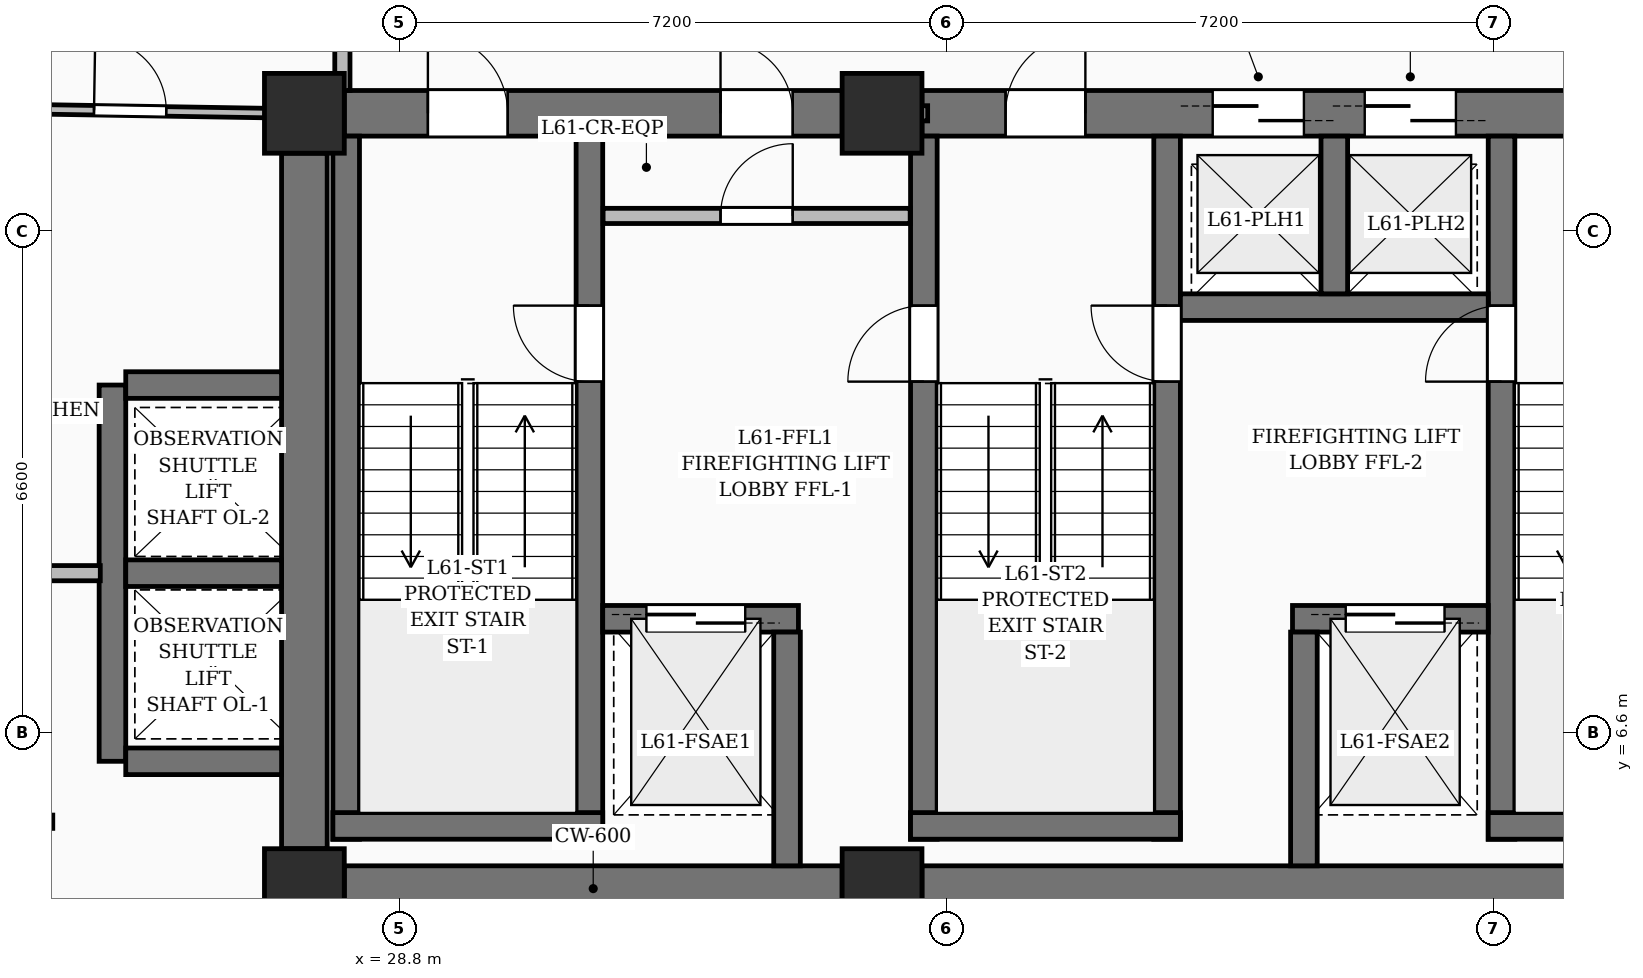
"""IFC4 building model, lengths in metres.
Left out: names, types, materials, properties, quantities, classifications, styles, units other than length and angle.
Written with IfcOpenShell. Run it as: python <this file> out.ifc"""

import sys

from ifc_helpers import new_model, si_unit, direction, frame, frame_2d, origin, origin_2d, place, context, subcontext, project, spatial, rectangle, extrude, element, fill, save


model = new_model("IFC4")
c1 = context("Model", 3, precision=1e-05, world=origin(), true_north=direction((0.0, 1.0)))
c2 = subcontext(c1, "Body", "Model", "MODEL_VIEW")
j1 = project(units=[si_unit("LENGTHUNIT", "METRE"), si_unit("PLANEANGLEUNIT", "RADIAN")], contexts=[c1])
p1 = place(None, origin())
s1 = spatial("IfcSite", under=j1, at=p1, CompositionType="ELEMENT")
p2 = place(p1, origin())
s2 = spatial("IfcBuilding", under=s1, at=p2, CompositionType="ELEMENT")
p3 = place(p2, frame((0.0, 0.0, 237.0)))
s3 = spatial("IfcBuildingStorey", under=s2, at=p3, CompositionType="ELEMENT", Elevation=237.0)
for number, where, z_axis, x_axis in (
    (1, (27.55, 4.55, 0.0), (0.0, 0.0, 1.0), (1.0, 0.0, 0.0)),
    (2, (35.15, 4.55, 0.0), (0.0, 0.0, 1.0), (1.0, 0.0, 0.0)),
    (3, (27.55, 14.75, 0.0), (0.0, 0.0, 1.0), (1.0, 0.0, 0.0)),
    (4, (35.15, 14.75, 0.0), (0.0, 0.0, 1.0), (1.0, 0.0, 0.0)),
):
    element("IfcColumn", number, at=place(p3, frame(where, z_axis=z_axis, x_axis=x_axis)), inside=s3, PredefinedType="COLUMN", context=c2, shape_type="SweptSolid", body=[
        extrude(rectangle(XDim=1.05, YDim=1.05, at=origin_2d()), origin(), (0.0, 0.0, 1.0), 3.75),
    ])
p4 = place(p3, frame((28.075, 4.55, 0.0), z_axis=(0.0, 0.0, 1.0), x_axis=(1.0, 0.0, 0.0)))
e5 = element("IfcWall", 5, at=p4, inside=s3, PredefinedType="SHEAR", context=c2, shape_type="SweptSolid", body=[
    extrude(rectangle(XDim=6.55, YDim=0.6, at=frame_2d((3.275, 0.0))), origin(), (0.0, 0.0, 1.0), 3.75),
])
p5 = place(p3, frame((35.675, 4.55, 0.0), z_axis=(0.0, 0.0, 1.0), x_axis=(1.0, 0.0, 0.0)))
e6 = element("IfcWall", 6, at=p5, inside=s3, PredefinedType="SHEAR", context=c2, shape_type="SweptSolid", body=[
    extrude(rectangle(XDim=10.85, YDim=0.6, at=frame_2d((5.425, 0.0))), origin(), (0.0, 0.0, 1.0), 3.75),
])
p6 = place(p3, frame((28.075, 14.75, 0.0), z_axis=(0.0, 0.0, 1.0), x_axis=(1.0, 0.0, 0.0)))
e7 = element("IfcWall", 7, at=p6, inside=s3, PredefinedType="SHEAR", context=c2, shape_type="SweptSolid", body=[
    extrude(rectangle(XDim=6.55, YDim=0.6, at=frame_2d((3.275, 0.0))), origin(), (0.0, 0.0, 1.0), 3.75),
])
p7 = place(p6, frame((1.1, 0.0, 0.0)))
e8 = element("IfcOpeningElement", 8, at=p7, cuts=e7, PredefinedType="OPENING", context=c2, shape_type="SweptSolid", body=[
    extrude(rectangle(XDim=1.05, YDim=2.15, at=frame_2d((0.525, 1.075))), frame((0.0, 0.31, 0.0), z_axis=(0.0, -1.0, 0.0), x_axis=(1.0, 0.0, 0.0)), (0.0, 0.0, 1.0), 0.62),
])
p8 = place(p6, frame((4.95, 0.0, 0.0)))
e9 = element("IfcOpeningElement", 9, at=p8, cuts=e7, PredefinedType="OPENING", context=c2, shape_type="SweptSolid", body=[
    extrude(rectangle(XDim=0.95, YDim=2.15, at=frame_2d((0.475, 1.075))), frame((0.0, 0.31, 0.0), z_axis=(0.0, -1.0, 0.0), x_axis=(1.0, 0.0, 0.0)), (0.0, 0.0, 1.0), 0.62),
])
p9 = place(p3, frame((35.675, 14.75, 0.0), z_axis=(0.0, 0.0, 1.0), x_axis=(1.0, 0.0, 0.0)))
e10 = element("IfcWall", 10, at=p9, inside=s3, PredefinedType="SHEAR", context=c2, shape_type="SweptSolid", body=[
    extrude(rectangle(XDim=10.85, YDim=0.6, at=frame_2d((5.425, 0.0))), origin(), (0.0, 0.0, 1.0), 3.75),
])
p10 = place(p9, frame((1.1, 0.0, 0.0)))
e11 = element("IfcOpeningElement", 11, at=p10, cuts=e10, PredefinedType="OPENING", context=c2, shape_type="SweptSolid", body=[
    extrude(rectangle(XDim=1.05, YDim=2.15, at=frame_2d((0.525, 1.075))), frame((0.0, 0.31, 0.0), z_axis=(0.0, -1.0, 0.0), x_axis=(1.0, 0.0, 0.0)), (0.0, 0.0, 1.0), 0.62),
])
p11 = place(p9, frame((8.7, 0.0, 0.0)))
e12 = element("IfcOpeningElement", 12, at=p11, cuts=e10, PredefinedType="OPENING", context=c2, shape_type="SweptSolid", body=[
    extrude(rectangle(XDim=1.05, YDim=2.15, at=frame_2d((0.525, 1.075))), frame((0.0, 0.31, 0.0), z_axis=(0.0, -1.0, 0.0), x_axis=(1.0, 0.0, 0.0)), (0.0, 0.0, 1.0), 0.62),
])
p12 = place(p9, frame((3.825, 0.0, 0.0)))
e13 = element("IfcOpeningElement", 13, at=p12, cuts=e10, PredefinedType="OPENING", context=c2, shape_type="SweptSolid", body=[
    extrude(rectangle(XDim=1.2, YDim=2.2, at=frame_2d((0.6, 1.1))), frame((0.0, 0.31, 0.0), z_axis=(0.0, -1.0, 0.0), x_axis=(1.0, 0.0, 0.0)), (0.0, 0.0, 1.0), 0.62),
])
p13 = place(p9, frame((5.825, 0.0, 0.0)))
e14 = element("IfcOpeningElement", 14, at=p13, cuts=e10, PredefinedType="OPENING", context=c2, shape_type="SweptSolid", body=[
    extrude(rectangle(XDim=1.2, YDim=2.2, at=frame_2d((0.6, 1.1))), frame((0.0, 0.31, 0.0), z_axis=(0.0, -1.0, 0.0), x_axis=(1.0, 0.0, 0.0)), (0.0, 0.0, 1.0), 0.62),
])
p14 = place(p3, frame((27.55, 5.075, 0.0), z_axis=(0.0, 0.0, 1.0), x_axis=(0.0, 1.0, 0.0)))
e15 = element("IfcWall", 15, at=p14, inside=s3, PredefinedType="SHEAR", context=c2, shape_type="SweptSolid", body=[
    extrude(rectangle(XDim=9.15, YDim=0.6, at=frame_2d((4.575, 0.0))), origin(), (0.0, 0.0, 1.0), 3.75),
])
p15 = place(p3, frame((28.1, 5.2, 0.0), z_axis=(0.0, 0.0, 1.0), x_axis=(0.0, 1.0, 0.0)))
e16 = element("IfcWall", 16, at=p15, inside=s3, PredefinedType="SOLIDWALL", context=c2, shape_type="SweptSolid", body=[
    extrude(rectangle(XDim=9.25, YDim=0.35, at=frame_2d((4.625, 0.0))), origin(), (0.0, 0.0, 1.0), 3.75),
])
p16 = place(p3, frame((31.3, 5.2, 0.0), z_axis=(0.0, 0.0, 1.0), x_axis=(0.0, 1.0, 0.0)))
e17 = element("IfcWall", 17, at=p16, inside=s3, PredefinedType="SOLIDWALL", context=c2, shape_type="SweptSolid", body=[
    extrude(rectangle(XDim=9.25, YDim=0.35, at=frame_2d((4.625, 0.0))), origin(), (0.0, 0.0, 1.0), 3.75),
])
p17 = place(p16, frame((6.02, 0.0, 0.0)))
e18 = element("IfcOpeningElement", 18, at=p17, cuts=e17, PredefinedType="OPENING", context=c2, shape_type="SweptSolid", body=[
    extrude(rectangle(XDim=1.0, YDim=2.15, at=frame_2d((0.5, 1.075))), frame((0.0, 0.185, 0.0), z_axis=(0.0, -1.0, 0.0), x_axis=(1.0, 0.0, 0.0)), (0.0, 0.0, 1.0), 0.37),
])
p18 = place(p3, frame((27.925, 5.375, 0.0), z_axis=(0.0, 0.0, 1.0), x_axis=(1.0, 0.0, 0.0)))
e19 = element("IfcWall", 19, at=p18, inside=s3, PredefinedType="SOLIDWALL", context=c2, shape_type="SweptSolid", body=[
    extrude(rectangle(XDim=3.55, YDim=0.35, at=frame_2d((1.775, 0.0))), origin(), (0.0, 0.0, 1.0), 3.75),
])
p19 = place(p3, frame((35.7, 5.2, 0.0), z_axis=(0.0, 0.0, 1.0), x_axis=(0.0, 1.0, 0.0)))
e20 = element("IfcWall", 20, at=p19, inside=s3, PredefinedType="SOLIDWALL", context=c2, shape_type="SweptSolid", body=[
    extrude(rectangle(XDim=9.25, YDim=0.35, at=frame_2d((4.625, 0.0))), origin(), (0.0, 0.0, 1.0), 3.75),
])
p20 = place(p19, frame((6.02, 0.0, 0.0)))
e21 = element("IfcOpeningElement", 21, at=p20, cuts=e20, PredefinedType="OPENING", context=c2, shape_type="SweptSolid", body=[
    extrude(rectangle(XDim=1.0, YDim=2.15, at=frame_2d((0.5, 1.075))), frame((0.0, 0.185, 0.0), z_axis=(0.0, -1.0, 0.0), x_axis=(1.0, 0.0, 0.0)), (0.0, 0.0, 1.0), 0.37),
])
p21 = place(p3, frame((38.9, 5.2, 0.0), z_axis=(0.0, 0.0, 1.0), x_axis=(0.0, 1.0, 0.0)))
e22 = element("IfcWall", 22, at=p21, inside=s3, PredefinedType="SOLIDWALL", context=c2, shape_type="SweptSolid", body=[
    extrude(rectangle(XDim=9.25, YDim=0.35, at=frame_2d((4.625, 0.0))), origin(), (0.0, 0.0, 1.0), 3.75),
])
p22 = place(p21, frame((6.02, 0.0, 0.0)))
e23 = element("IfcOpeningElement", 23, at=p22, cuts=e22, PredefinedType="OPENING", context=c2, shape_type="SweptSolid", body=[
    extrude(rectangle(XDim=1.0, YDim=2.15, at=frame_2d((0.5, 1.075))), frame((0.0, 0.185, 0.0), z_axis=(0.0, -1.0, 0.0), x_axis=(1.0, 0.0, 0.0)), (0.0, 0.0, 1.0), 0.37),
])
p23 = place(p3, frame((35.525, 5.375, 0.0), z_axis=(0.0, 0.0, 1.0), x_axis=(1.0, 0.0, 0.0)))
e24 = element("IfcWall", 24, at=p23, inside=s3, PredefinedType="SOLIDWALL", context=c2, shape_type="SweptSolid", body=[
    extrude(rectangle(XDim=3.55, YDim=0.35, at=frame_2d((1.775, 0.0))), origin(), (0.0, 0.0, 1.0), 3.75),
])
p24 = place(p3, frame((43.3, 5.2, 0.0), z_axis=(0.0, 0.0, 1.0), x_axis=(0.0, 1.0, 0.0)))
e25 = element("IfcWall", 25, at=p24, inside=s3, PredefinedType="SOLIDWALL", context=c2, shape_type="SweptSolid", body=[
    extrude(rectangle(XDim=9.25, YDim=0.35, at=frame_2d((4.625, 0.0))), origin(), (0.0, 0.0, 1.0), 3.75),
])
p25 = place(p24, frame((6.02, 0.0, 0.0)))
e26 = element("IfcOpeningElement", 26, at=p25, cuts=e25, PredefinedType="OPENING", context=c2, shape_type="SweptSolid", body=[
    extrude(rectangle(XDim=1.0, YDim=2.15, at=frame_2d((0.5, 1.075))), frame((0.0, 0.185, 0.0), z_axis=(0.0, -1.0, 0.0), x_axis=(1.0, 0.0, 0.0)), (0.0, 0.0, 1.0), 0.37),
])
p26 = place(p3, frame((43.125, 5.375, 0.0), z_axis=(0.0, 0.0, 1.0), x_axis=(1.0, 0.0, 0.0)))
e27 = element("IfcWall", 27, at=p26, inside=s3, PredefinedType="SOLIDWALL", context=c2, shape_type="SweptSolid", body=[
    extrude(rectangle(XDim=3.55, YDim=0.35, at=frame_2d((1.775, 0.0))), origin(), (0.0, 0.0, 1.0), 3.75),
])
p27 = place(p3, frame((31.475, 8.1, 0.0), z_axis=(0.0, 0.0, 1.0), x_axis=(1.0, 0.0, 0.0)))
e28 = element("IfcWall", 28, at=p27, inside=s3, PredefinedType="SOLIDWALL", context=c2, shape_type="SweptSolid", body=[
    extrude(rectangle(XDim=2.575, YDim=0.35, at=frame_2d((1.288, 0.0))), origin(), (0.0, 0.0, 1.0), 3.75),
])
p28 = place(p27, frame((0.575, 0.0, 0.0)))
e29 = element("IfcOpeningElement", 29, at=p28, cuts=e28, PredefinedType="OPENING", context=c2, shape_type="SweptSolid", body=[
    extrude(rectangle(XDim=1.3, YDim=2.25, at=frame_2d((0.65, 1.125))), frame((0.0, 0.185, 0.0), z_axis=(0.0, -1.0, 0.0), x_axis=(1.0, 0.0, 0.0)), (0.0, 0.0, 1.0), 0.37),
])
p29 = place(p3, frame((40.55, 8.1, 0.0), z_axis=(0.0, 0.0, 1.0), x_axis=(1.0, 0.0, 0.0)))
e30 = element("IfcWall", 30, at=p29, inside=s3, PredefinedType="SOLIDWALL", context=c2, shape_type="SweptSolid", body=[
    extrude(rectangle(XDim=2.575, YDim=0.35, at=frame_2d((1.288, 0.0))), origin(), (0.0, 0.0, 1.0), 3.75),
])
p30 = place(p29, frame((0.7, 0.0, 0.0)))
e31 = element("IfcOpeningElement", 31, at=p30, cuts=e30, PredefinedType="OPENING", context=c2, shape_type="SweptSolid", body=[
    extrude(rectangle(XDim=1.3, YDim=2.25, at=frame_2d((0.65, 1.125))), frame((0.0, 0.185, 0.0), z_axis=(0.0, -1.0, 0.0), x_axis=(1.0, 0.0, 0.0)), (0.0, 0.0, 1.0), 0.37),
])
for number, where, z_axis, x_axis in (
    (32, (33.9, 4.85, 0.0), (0.0, 0.0, 1.0), (0.0, 1.0, 0.0)),
    (33, (40.7, 4.85, 0.0), (0.0, 0.0, 1.0), (0.0, 1.0, 0.0)),
):
    element("IfcWall", number, at=place(p3, frame(where, z_axis=z_axis, x_axis=x_axis)), inside=s3, PredefinedType="SOLIDWALL", context=c2, shape_type="SweptSolid", body=[
        extrude(rectangle(XDim=3.075, YDim=0.35, at=frame_2d((1.538, 0.0))), origin(), (0.0, 0.0, 1.0), 3.75),
    ])
p31 = place(p3, frame((39.075, 12.2, 0.0), z_axis=(0.0, 0.0, 1.0), x_axis=(1.0, 0.0, 0.0)))
e34 = element("IfcWall", 34, at=p31, inside=s3, PredefinedType="SOLIDWALL", context=c2, shape_type="SweptSolid", body=[
    extrude(rectangle(XDim=4.05, YDim=0.35, at=frame_2d((2.025, 0.0))), origin(), (0.0, 0.0, 1.0), 3.75),
])
p32 = place(p3, frame((41.1, 12.375, 0.0), z_axis=(0.0, 0.0, 1.0), x_axis=(0.0, 1.0, 0.0)))
e35 = element("IfcWall", 35, at=p32, inside=s3, PredefinedType="SOLIDWALL", context=c2, shape_type="SweptSolid", body=[
    extrude(rectangle(XDim=2.075, YDim=0.35, at=frame_2d((1.038, 0.0))), origin(), (0.0, 0.0, 1.0), 3.75),
])
p33 = place(p3, frame((25.025, 6.225, 0.0), z_axis=(0.0, 0.0, 1.0), x_axis=(0.0, 1.0, 0.0)))
e36 = element("IfcWall", 36, at=p33, inside=s3, PredefinedType="SOLIDWALL", context=c2, shape_type="SweptSolid", body=[
    extrude(rectangle(XDim=4.95, YDim=0.35, at=frame_2d((2.475, 0.0))), origin(), (0.0, 0.0, 1.0), 3.75),
])
for number, where, z_axis, x_axis in (
    (37, (25.2, 6.225, 0.0), (0.0, 0.0, 1.0), (1.0, 0.0, 0.0)),
    (38, (25.2, 8.7, 0.0), (0.0, 0.0, 1.0), (1.0, 0.0, 0.0)),
    (39, (25.2, 11.175, 0.0), (0.0, 0.0, 1.0), (1.0, 0.0, 0.0)),
):
    element("IfcWall", number, at=place(p3, frame(where, z_axis=z_axis, x_axis=x_axis)), inside=s3, PredefinedType="SOLIDWALL", context=c2, shape_type="SweptSolid", body=[
        extrude(rectangle(XDim=2.05, YDim=0.35, at=frame_2d((1.025, 0.0))), origin(), (0.0, 0.0, 1.0), 3.75),
    ])
p34 = place(p3, frame((34.72, 14.75, 0.0), z_axis=(0.0, 0.0, 1.0), x_axis=(1.0, 0.0, 0.0)))
e40 = element("IfcWall", 40, at=p34, inside=s3, PredefinedType="PARTITIONING", context=c2, shape_type="SweptSolid", body=[
    extrude(rectangle(XDim=1.03, YDim=0.2, at=frame_2d((0.515, 0.0))), origin(), (0.0, 0.0, 1.0), 2.685),
])
p35 = place(p3, frame((31.48, 13.4, 0.0), z_axis=(0.0, 0.0, 1.0), x_axis=(1.0, 0.0, 0.0)))
e41 = element("IfcWall", 41, at=p35, inside=s3, PredefinedType="PARTITIONING", context=c2, shape_type="SweptSolid", body=[
    extrude(rectangle(XDim=4.04, YDim=0.2, at=frame_2d((2.02, 0.0))), origin(), (0.0, 0.0, 1.0), 3.5),
])
p36 = place(p35, frame((1.545, 0.0, 0.0)))
e42 = element("IfcOpeningElement", 42, at=p36, cuts=e41, PredefinedType="OPENING", context=c2, shape_type="SweptSolid", body=[
    extrude(rectangle(XDim=0.95, YDim=2.15, at=frame_2d((0.475, 1.075))), frame((0.0, 0.11, 0.0), z_axis=(0.0, -1.0, 0.0), x_axis=(1.0, 0.0, 0.0)), (0.0, 0.0, 1.0), 0.22),
])
p37 = place(p3, frame((28.05, 16.665, 0.0), z_axis=(0.0, 0.0, 1.0), x_axis=(0.0, -1.0, 0.0)))
e43 = element("IfcWall", 43, at=p37, inside=s3, PredefinedType="PARTITIONING", context=c2, shape_type="SweptSolid", body=[
    extrude(rectangle(XDim=1.615, YDim=0.2, at=frame_2d((0.808, 0.0))), origin(), (0.0, 0.0, 1.0), 3.16),
])
p38 = place(p3, frame((24.865, 8.7, 0.0), z_axis=(0.0, 0.0, 1.0), x_axis=(-1.0, 0.0, 0.0)))
e44 = element("IfcWall", 44, at=p38, inside=s3, PredefinedType="PARTITIONING", context=c2, shape_type="SweptSolid", body=[
    extrude(rectangle(XDim=3.605, YDim=0.2, at=frame_2d((1.802, 0.0))), origin(), (0.0, 0.0, 1.0), 2.685),
])
p39 = place(p3, frame((23.291, 14.815, 0.0), z_axis=(0.0, 0.0, 1.0), x_axis=(0.999865488885, -0.016401345587, 0.0)))
e45 = element("IfcWall", 45, at=p39, inside=s3, PredefinedType="PARTITIONING", context=c2, shape_type="SweptSolid", body=[
    extrude(rectangle(XDim=3.959, YDim=0.125, at=frame_2d((1.98, 0.0))), origin(), (0.0, 0.0, 1.0), 2.82),
])
p40 = place(p39, frame((1.492, 0.0, 0.0)))
e46 = element("IfcOpeningElement", 46, at=p40, cuts=e45, PredefinedType="OPENING", context=c2, shape_type="SweptSolid", body=[
    extrude(rectangle(XDim=0.95, YDim=2.2, at=frame_2d((0.475, 1.1))), frame((0.0, 0.072, 0.0), z_axis=(0.0, -1.0, 0.0), x_axis=(1.0, 0.0, 0.0)), (0.0, 0.0, 1.0), 0.145),
])
p41 = place(p7, origin())
e47 = element("IfcDoor", 47, at=p41, inside=s3, OperationType="SINGLE_SWING_LEFT", PredefinedType="DOOR", context=c2, shape_type="SweptSolid", body=[
    extrude(rectangle(XDim=1.05, YDim=2.15, at=frame_2d((0.525, 1.075))), frame((0.0, 0.025, 0.0), z_axis=(0.0, -1.0, 0.0), x_axis=(1.0, 0.0, 0.0)), (0.0, 0.0, 1.0), 0.05),
])
fill(e8, e47)
p42 = place(p10, origin())
e48 = element("IfcDoor", 48, at=p42, inside=s3, OperationType="SINGLE_SWING_RIGHT", PredefinedType="DOOR", context=c2, shape_type="SweptSolid", body=[
    extrude(rectangle(XDim=1.05, YDim=2.15, at=frame_2d((0.525, 1.075))), frame((0.0, 0.025, 0.0), z_axis=(0.0, -1.0, 0.0), x_axis=(1.0, 0.0, 0.0)), (0.0, 0.0, 1.0), 0.05),
])
fill(e11, e48)
p43 = place(p17, origin())
e49 = element("IfcDoor", 49, at=p43, inside=s3, OperationType="SINGLE_SWING_RIGHT", PredefinedType="DOOR", context=c2, shape_type="SweptSolid", body=[
    extrude(rectangle(XDim=1.0, YDim=2.15, at=frame_2d((0.5, 1.075))), frame((0.0, 0.025, 0.0), z_axis=(0.0, -1.0, 0.0), x_axis=(1.0, 0.0, 0.0)), (0.0, 0.0, 1.0), 0.05),
])
fill(e18, e49)
p44 = place(p20, origin())
e50 = element("IfcDoor", 50, at=p44, inside=s3, OperationType="SINGLE_SWING_LEFT", PredefinedType="DOOR", context=c2, shape_type="SweptSolid", body=[
    extrude(rectangle(XDim=1.0, YDim=2.15, at=frame_2d((0.5, 1.075))), frame((0.0, 0.025, 0.0), z_axis=(0.0, -1.0, 0.0), x_axis=(1.0, 0.0, 0.0)), (0.0, 0.0, 1.0), 0.05),
])
fill(e21, e50)
p45 = place(p22, origin())
e51 = element("IfcDoor", 51, at=p45, inside=s3, OperationType="SINGLE_SWING_RIGHT", PredefinedType="DOOR", context=c2, shape_type="SweptSolid", body=[
    extrude(rectangle(XDim=1.0, YDim=2.15, at=frame_2d((0.5, 1.075))), frame((0.0, 0.025, 0.0), z_axis=(0.0, -1.0, 0.0), x_axis=(1.0, 0.0, 0.0)), (0.0, 0.0, 1.0), 0.05),
])
fill(e23, e51)
p46 = place(p25, origin())
e52 = element("IfcDoor", 52, at=p46, inside=s3, OperationType="SINGLE_SWING_LEFT", PredefinedType="DOOR", context=c2, shape_type="SweptSolid", body=[
    extrude(rectangle(XDim=1.0, YDim=2.15, at=frame_2d((0.5, 1.075))), frame((0.0, 0.025, 0.0), z_axis=(0.0, -1.0, 0.0), x_axis=(1.0, 0.0, 0.0)), (0.0, 0.0, 1.0), 0.05),
])
fill(e26, e52)
p47 = place(p28, origin())
e53 = element("IfcDoor", 53, at=p47, inside=s3, OperationType="DOUBLE_DOOR_SLIDING", PredefinedType="DOOR", context=c2, shape_type="SweptSolid", body=[
    extrude(rectangle(XDim=1.3, YDim=2.25, at=frame_2d((0.65, 1.125))), frame((0.0, 0.025, 0.0), z_axis=(0.0, -1.0, 0.0), x_axis=(1.0, 0.0, 0.0)), (0.0, 0.0, 1.0), 0.05),
])
fill(e29, e53)
p48 = place(p30, origin())
e54 = element("IfcDoor", 54, at=p48, inside=s3, OperationType="DOUBLE_DOOR_SLIDING", PredefinedType="DOOR", context=c2, shape_type="SweptSolid", body=[
    extrude(rectangle(XDim=1.3, YDim=2.25, at=frame_2d((0.65, 1.125))), frame((0.0, 0.025, 0.0), z_axis=(0.0, -1.0, 0.0), x_axis=(1.0, 0.0, 0.0)), (0.0, 0.0, 1.0), 0.05),
])
fill(e31, e54)
p49 = place(p12, origin())
e55 = element("IfcDoor", 55, at=p49, inside=s3, OperationType="DOUBLE_DOOR_SLIDING", PredefinedType="DOOR", context=c2, shape_type="SweptSolid", body=[
    extrude(rectangle(XDim=1.2, YDim=2.2, at=frame_2d((0.6, 1.1))), frame((0.0, 0.025, 0.0), z_axis=(0.0, -1.0, 0.0), x_axis=(1.0, 0.0, 0.0)), (0.0, 0.0, 1.0), 0.05),
])
fill(e13, e55)
p50 = place(p13, origin())
e56 = element("IfcDoor", 56, at=p50, inside=s3, OperationType="DOUBLE_DOOR_SLIDING", PredefinedType="DOOR", context=c2, shape_type="SweptSolid", body=[
    extrude(rectangle(XDim=1.2, YDim=2.2, at=frame_2d((0.6, 1.1))), frame((0.0, 0.025, 0.0), z_axis=(0.0, -1.0, 0.0), x_axis=(1.0, 0.0, 0.0)), (0.0, 0.0, 1.0), 0.05),
])
fill(e14, e56)
p51 = place(p36, origin())
e57 = element("IfcDoor", 57, at=p51, inside=s3, OperationType="SINGLE_SWING_RIGHT", PredefinedType="DOOR", context=c2, shape_type="SweptSolid", body=[
    extrude(rectangle(XDim=0.95, YDim=2.15, at=frame_2d((0.475, 1.075))), frame((0.0, 0.025, 0.0), z_axis=(0.0, -1.0, 0.0), x_axis=(1.0, 0.0, 0.0)), (0.0, 0.0, 1.0), 0.05),
])
fill(e42, e57)
p52 = place(p8, origin())
e58 = element("IfcDoor", 58, at=p52, inside=s3, OperationType="SINGLE_SWING_LEFT", PredefinedType="DOOR", context=c2, shape_type="SweptSolid", body=[
    extrude(rectangle(XDim=0.95, YDim=2.15, at=frame_2d((0.475, 1.075))), frame((0.0, 0.025, 0.0), z_axis=(0.0, -1.0, 0.0), x_axis=(1.0, 0.0, 0.0)), (0.0, 0.0, 1.0), 0.05),
])
fill(e9, e58)
p53 = place(p40, origin())
e59 = element("IfcDoor", 59, at=p53, inside=s3, OperationType="SINGLE_SWING_LEFT", PredefinedType="DOOR", context=c2, shape_type="SweptSolid", body=[
    extrude(rectangle(XDim=0.95, YDim=2.2, at=frame_2d((0.475, 1.1))), frame((0.0, 0.025, 0.0), z_axis=(0.0, -1.0, 0.0), x_axis=(1.0, 0.0, 0.0)), (0.0, 0.0, 1.0), 0.05),
])
fill(e46, e59)
save(model, sys.argv[1])
